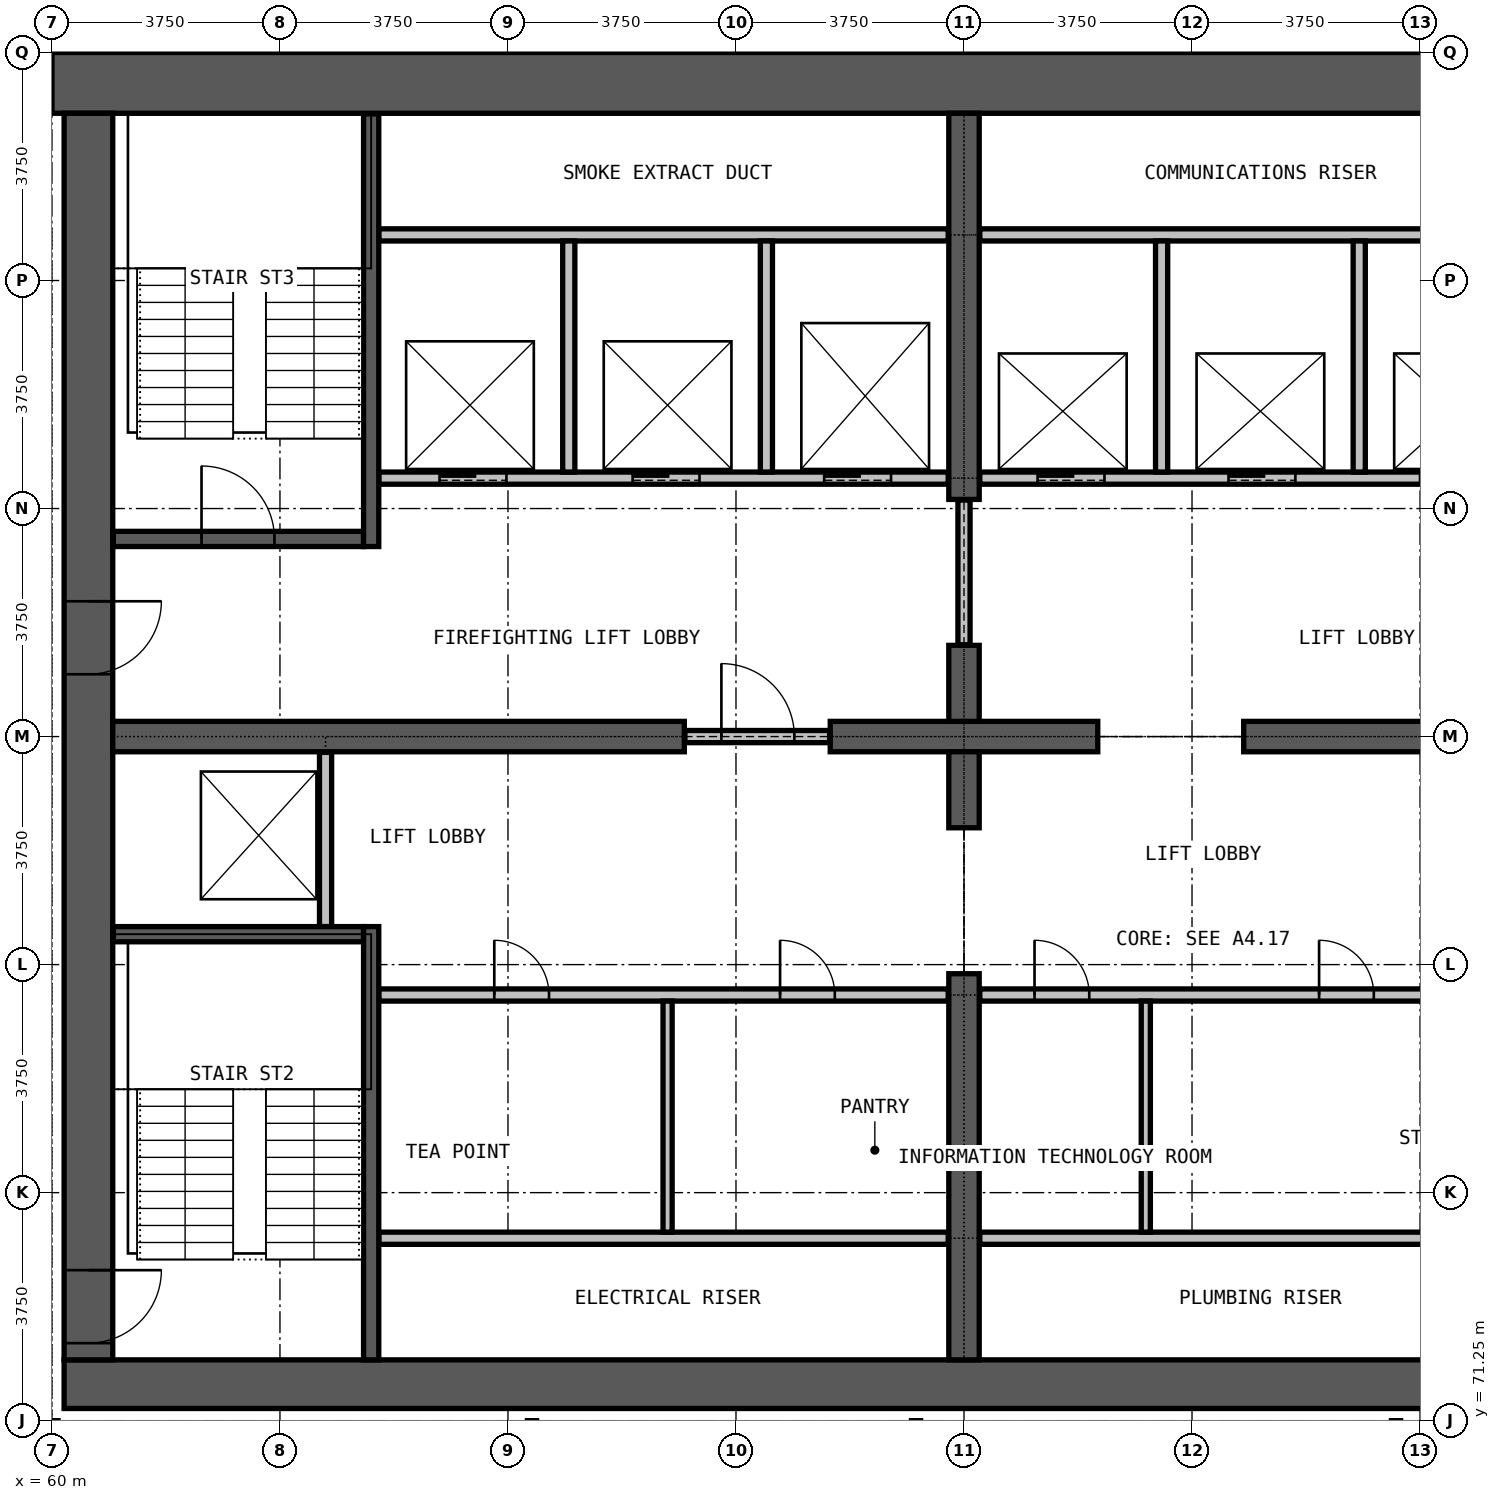
"""IFC4 building model, lengths in metres.
Left out: names, types, materials, properties, quantities, classifications, styles, units other than length and angle.
Written with IfcOpenShell. Run it as: python <this file> out.ifc"""

import sys

from ifc_helpers import new_model, si_unit, direction, frame, frame_2d, origin, place, context, subcontext, project, spatial, rectangle, extrude, element, fill, save


model = new_model("IFC4")
c1 = context("Model", 3, precision=1e-05, world=origin(), true_north=direction((0.0, 1.0)))
c2 = subcontext(c1, "Body", "Model", "MODEL_VIEW")
j1 = project(units=[si_unit("LENGTHUNIT", "METRE"), si_unit("PLANEANGLEUNIT", "RADIAN")], contexts=[c1])
p1 = place(None, origin())
s1 = spatial("IfcSite", under=j1, at=p1, CompositionType="ELEMENT")
p2 = place(p1, origin())
s2 = spatial("IfcBuilding", under=s1, at=p2, CompositionType="ELEMENT")
p3 = place(p2, frame((0.0, 0.0, 162.1)))
s3 = spatial("IfcBuildingStorey", under=s2, at=p3, CompositionType="ELEMENT", Elevation=162.1)
p4 = place(p3, frame((60.2, 71.85, 0.0), z_axis=(0.0, 0.0, 1.0), x_axis=(1.0, 0.0, 0.0)))
e1 = element("IfcWall", 1, at=p4, inside=s3, PredefinedType="SHEAR", context=c2, shape_type="SweptSolid", body=[
    extrude(rectangle(XDim=29.6, YDim=0.8, at=frame_2d((14.8, 0.0))), origin(), (0.0, 0.0, 1.0), 3.6),
])
p5 = place(p3, frame((90.0, 93.25, 0.0), z_axis=(0.0, 0.0, 1.0), x_axis=(-1.0, 0.0, 0.0)))
e2 = element("IfcWall", 2, at=p5, inside=s3, PredefinedType="SHEAR", context=c2, shape_type="SweptSolid", body=[
    extrude(rectangle(XDim=30.0, YDim=1.0, at=frame_2d((15.0, 0.0))), origin(), (0.0, 0.0, 1.0), 3.6),
])
p6 = place(p3, frame((60.6, 92.75, 0.0), z_axis=(0.0, 0.0, 1.0), x_axis=(0.0, -1.0, 0.0)))
e3 = element("IfcWall", 3, at=p6, inside=s3, PredefinedType="SHEAR", context=c2, shape_type="SweptSolid", body=[
    extrude(rectangle(XDim=20.5, YDim=0.8, at=frame_2d((10.25, 0.0))), origin(), (0.0, 0.0, 1.0), 3.6),
])
p7 = place(p6, frame((19.025, 0.0, 0.0)))
e4 = element("IfcOpeningElement", 4, at=p7, cuts=e3, PredefinedType="OPENING", context=c2, shape_type="SweptSolid", body=[
    extrude(rectangle(XDim=1.2, YDim=2.2, at=frame_2d((0.6, 1.1))), frame((0.0, 0.41, 0.0), z_axis=(0.0, -1.0, 0.0), x_axis=(1.0, 0.0, 0.0)), (0.0, 0.0, 1.0), 0.82),
])
p8 = place(p6, frame((8.025, 0.0, 0.0)))
e5 = element("IfcOpeningElement", 5, at=p8, cuts=e3, PredefinedType="OPENING", context=c2, shape_type="SweptSolid", body=[
    extrude(rectangle(XDim=1.2, YDim=2.2, at=frame_2d((0.6, 1.1))), frame((0.0, 0.41, 0.0), z_axis=(0.0, -1.0, 0.0), x_axis=(1.0, 0.0, 0.0)), (0.0, 0.0, 1.0), 0.82),
])
p9 = place(p3, frame((61.0, 82.5, 0.0), z_axis=(0.0, 0.0, 1.0), x_axis=(1.0, 0.0, 0.0)))
e6 = element("IfcWall", 6, at=p9, inside=s3, PredefinedType="SHEAR", context=c2, shape_type="SweptSolid", body=[
    extrude(rectangle(XDim=9.4, YDim=0.5, at=frame_2d((4.7, 0.0))), origin(), (0.0, 0.0, 1.0), 3.6),
])
p10 = place(p3, frame((72.8, 82.5, 0.0), z_axis=(0.0, 0.0, 1.0), x_axis=(1.0, 0.0, 0.0)))
e7 = element("IfcWall", 7, at=p10, inside=s3, PredefinedType="SHEAR", context=c2, shape_type="SweptSolid", body=[
    extrude(rectangle(XDim=4.4, YDim=0.5, at=frame_2d((2.2, 0.0))), origin(), (0.0, 0.0, 1.0), 3.6),
])
p11 = place(p3, frame((79.6, 82.5, 0.0), z_axis=(0.0, 0.0, 1.0), x_axis=(1.0, 0.0, 0.0)))
e8 = element("IfcWall", 8, at=p11, inside=s3, PredefinedType="SHEAR", context=c2, shape_type="SweptSolid", body=[
    extrude(rectangle(XDim=9.4, YDim=0.5, at=frame_2d((4.7, 0.0))), origin(), (0.0, 0.0, 1.0), 3.6),
])
p12 = place(p3, frame((75.0, 72.25, 0.0), z_axis=(0.0, 0.0, 1.0), x_axis=(0.0, 1.0, 0.0)))
e9 = element("IfcWall", 9, at=p12, inside=s3, PredefinedType="SHEAR", context=c2, shape_type="SweptSolid", body=[
    extrude(rectangle(XDim=6.35, YDim=0.5, at=frame_2d((3.175, 0.0))), origin(), (0.0, 0.0, 1.0), 3.6),
])
for number, where, z_axis, x_axis in (
    (10, (75.0, 81.0, 0.0), (0.0, 0.0, 1.0), (0.0, 1.0, 0.0)),
    (11, (75.0, 82.75, 0.0), (0.0, 0.0, 1.0), (0.0, 1.0, 0.0)),
):
    element("IfcWall", number, at=place(p3, frame(where, z_axis=z_axis, x_axis=x_axis)), inside=s3, PredefinedType="SHEAR", context=c2, shape_type="SweptSolid", body=[
        extrude(rectangle(XDim=1.25, YDim=0.5, at=frame_2d((0.625, 0.0))), origin(), (0.0, 0.0, 1.0), 3.6),
    ])
p13 = place(p3, frame((75.0, 86.4, 0.0), z_axis=(0.0, 0.0, 1.0), x_axis=(0.0, 1.0, 0.0)))
e12 = element("IfcWall", 12, at=p13, inside=s3, PredefinedType="SHEAR", context=c2, shape_type="SweptSolid", body=[
    extrude(rectangle(XDim=6.35, YDim=0.5, at=frame_2d((3.175, 0.0))), origin(), (0.0, 0.0, 1.0), 3.6),
])
for number, where, z_axis, x_axis in (
    (13, (65.375, 74.25, 0.0), (0.0, 0.0, 1.0), (1.0, 0.0, 0.0)),
    (14, (75.26, 74.25, 0.0), (0.0, 0.0, 1.0), (1.0, 0.0, 0.0)),
):
    element("IfcWall", number, at=place(p3, frame(where, z_axis=z_axis, x_axis=x_axis)), inside=s3, PredefinedType="PARTITIONING", context=c2, shape_type="SweptSolid", body=[
        extrude(rectangle(XDim=9.365, YDim=0.2, at=frame_2d((4.683, 0.0))), origin(), (0.0, 0.0, 1.0), 3.3),
    ])
p14 = place(p3, frame((65.375, 78.25, 0.0), z_axis=(0.0, 0.0, 1.0), x_axis=(1.0, 0.0, 0.0)))
e15 = element("IfcWall", 15, at=p14, inside=s3, PredefinedType="PARTITIONING", context=c2, shape_type="SweptSolid", body=[
    extrude(rectangle(XDim=9.365, YDim=0.2, at=frame_2d((4.683, 0.0))), origin(), (0.0, 0.0, 1.0), 3.3),
])
p15 = place(p14, frame((1.9, 0.0, 0.0)))
e16 = element("IfcOpeningElement", 16, at=p15, cuts=e15, PredefinedType="OPENING", context=c2, shape_type="SweptSolid", body=[
    extrude(rectangle(XDim=0.9, YDim=2.2, at=frame_2d((0.45, 1.1))), frame((0.0, 0.11, 0.0), z_axis=(0.0, -1.0, 0.0), x_axis=(1.0, 0.0, 0.0)), (0.0, 0.0, 1.0), 0.22),
])
p16 = place(p14, frame((6.6, 0.0, 0.0)))
e17 = element("IfcOpeningElement", 17, at=p16, cuts=e15, PredefinedType="OPENING", context=c2, shape_type="SweptSolid", body=[
    extrude(rectangle(XDim=0.9, YDim=2.2, at=frame_2d((0.45, 1.1))), frame((0.0, 0.11, 0.0), z_axis=(0.0, -1.0, 0.0), x_axis=(1.0, 0.0, 0.0)), (0.0, 0.0, 1.0), 0.22),
])
p17 = place(p3, frame((75.26, 78.25, 0.0), z_axis=(0.0, 0.0, 1.0), x_axis=(1.0, 0.0, 0.0)))
e18 = element("IfcWall", 18, at=p17, inside=s3, PredefinedType="PARTITIONING", context=c2, shape_type="SweptSolid", body=[
    extrude(rectangle(XDim=9.365, YDim=0.2, at=frame_2d((4.683, 0.0))), origin(), (0.0, 0.0, 1.0), 3.3),
])
p18 = place(p17, frame((0.9, 0.0, 0.0)))
e19 = element("IfcOpeningElement", 19, at=p18, cuts=e18, PredefinedType="OPENING", context=c2, shape_type="SweptSolid", body=[
    extrude(rectangle(XDim=0.9, YDim=2.2, at=frame_2d((0.45, 1.1))), frame((0.0, 0.11, 0.0), z_axis=(0.0, -1.0, 0.0), x_axis=(1.0, 0.0, 0.0)), (0.0, 0.0, 1.0), 0.22),
])
p19 = place(p17, frame((5.58, 0.0, 0.0)))
e20 = element("IfcOpeningElement", 20, at=p19, cuts=e18, PredefinedType="OPENING", context=c2, shape_type="SweptSolid", body=[
    extrude(rectangle(XDim=0.9, YDim=2.2, at=frame_2d((0.45, 1.1))), frame((0.0, 0.11, 0.0), z_axis=(0.0, -1.0, 0.0), x_axis=(1.0, 0.0, 0.0)), (0.0, 0.0, 1.0), 0.22),
])
p20 = place(p3, frame((70.41, 82.5, 0.0), z_axis=(0.0, 0.0, 1.0), x_axis=(1.0, 0.0, 0.0)))
e21 = element("IfcWall", 21, at=p20, inside=s3, PredefinedType="PARTITIONING", context=c2, shape_type="SweptSolid", body=[
    extrude(rectangle(XDim=2.38, YDim=0.2, at=frame_2d((1.19, 0.0))), origin(), (0.0, 0.0, 1.0), 2.4),
])
p21 = place(p20, frame((0.6, 0.0, 0.0)))
e22 = element("IfcOpeningElement", 22, at=p21, cuts=e21, PredefinedType="OPENING", context=c2, shape_type="SweptSolid", body=[
    extrude(rectangle(XDim=1.2, YDim=2.2, at=frame_2d((0.6, 1.1))), frame((0.0, 0.11, 0.0), z_axis=(0.0, -1.0, 0.0), x_axis=(1.0, 0.0, 0.0)), (0.0, 0.0, 1.0), 0.22),
])
p22 = place(p3, frame((75.0, 84.01, 0.0), z_axis=(0.0, 0.0, 1.0), x_axis=(0.0, 1.0, 0.0)))
e23 = element("IfcWall", 23, at=p22, inside=s3, PredefinedType="PARTITIONING", context=c2, shape_type="SweptSolid", body=[
    extrude(rectangle(XDim=2.38, YDim=0.2, at=frame_2d((1.19, 0.0))), origin(), (0.0, 0.0, 1.0), 2.4),
])
for number, where, z_axis, x_axis in (
    (24, (70.125, 74.35, 0.0), (0.0, 0.0, 1.0), (0.0, 1.0, 0.0)),
    (25, (77.99, 74.35, 0.0), (0.0, 0.0, 1.0), (0.0, 1.0, 0.0)),
):
    element("IfcWall", number, at=place(p3, frame(where, z_axis=z_axis, x_axis=x_axis)), inside=s3, PredefinedType="PARTITIONING", context=c2, shape_type="SweptSolid", body=[
        extrude(rectangle(XDim=3.8, YDim=0.15, at=frame_2d((1.9, 0.0))), origin(), (0.0, 0.0, 1.0), 3.3),
    ])
p23 = place(p3, frame((65.375, 86.75, 0.0), z_axis=(0.0, 0.0, 1.0), x_axis=(1.0, 0.0, 0.0)))
e26 = element("IfcWall", 26, at=p23, inside=s3, PredefinedType="PARTITIONING", context=c2, shape_type="SweptSolid", body=[
    extrude(rectangle(XDim=9.365, YDim=0.2, at=frame_2d((4.683, 0.0))), origin(), (0.0, 0.0, 1.0), 3.3),
])
p24 = place(p23, frame((1.0, 0.0, 0.0)))
e27 = element("IfcOpeningElement", 27, at=p24, cuts=e26, PredefinedType="OPENING", context=c2, shape_type="SweptSolid", body=[
    extrude(rectangle(XDim=1.1, YDim=2.2, at=frame_2d((0.55, 1.1))), frame((0.0, 0.11, 0.0), z_axis=(0.0, -1.0, 0.0), x_axis=(1.0, 0.0, 0.0)), (0.0, 0.0, 1.0), 0.22),
])
p25 = place(p23, frame((4.175, 0.0, 0.0)))
e28 = element("IfcOpeningElement", 28, at=p25, cuts=e26, PredefinedType="OPENING", context=c2, shape_type="SweptSolid", body=[
    extrude(rectangle(XDim=1.1, YDim=2.2, at=frame_2d((0.55, 1.1))), frame((0.0, 0.11, 0.0), z_axis=(0.0, -1.0, 0.0), x_axis=(1.0, 0.0, 0.0)), (0.0, 0.0, 1.0), 0.22),
])
p26 = place(p23, frame((7.325, 0.0, 0.0)))
e29 = element("IfcOpeningElement", 29, at=p26, cuts=e26, PredefinedType="OPENING", context=c2, shape_type="SweptSolid", body=[
    extrude(rectangle(XDim=1.1, YDim=2.2, at=frame_2d((0.55, 1.1))), frame((0.0, 0.11, 0.0), z_axis=(0.0, -1.0, 0.0), x_axis=(1.0, 0.0, 0.0)), (0.0, 0.0, 1.0), 0.22),
])
p27 = place(p3, frame((75.26, 86.75, 0.0), z_axis=(0.0, 0.0, 1.0), x_axis=(1.0, 0.0, 0.0)))
e30 = element("IfcWall", 30, at=p27, inside=s3, PredefinedType="PARTITIONING", context=c2, shape_type="SweptSolid", body=[
    extrude(rectangle(XDim=9.365, YDim=0.2, at=frame_2d((4.683, 0.0))), origin(), (0.0, 0.0, 1.0), 3.3),
])
p28 = place(p27, frame((0.95, 0.0, 0.0)))
e31 = element("IfcOpeningElement", 31, at=p28, cuts=e30, PredefinedType="OPENING", context=c2, shape_type="SweptSolid", body=[
    extrude(rectangle(XDim=1.1, YDim=2.2, at=frame_2d((0.55, 1.1))), frame((0.0, 0.11, 0.0), z_axis=(0.0, -1.0, 0.0), x_axis=(1.0, 0.0, 0.0)), (0.0, 0.0, 1.0), 0.22),
])
p29 = place(p27, frame((4.09, 0.0, 0.0)))
e32 = element("IfcOpeningElement", 32, at=p29, cuts=e30, PredefinedType="OPENING", context=c2, shape_type="SweptSolid", body=[
    extrude(rectangle(XDim=1.1, YDim=2.2, at=frame_2d((0.55, 1.1))), frame((0.0, 0.11, 0.0), z_axis=(0.0, -1.0, 0.0), x_axis=(1.0, 0.0, 0.0)), (0.0, 0.0, 1.0), 0.22),
])
p30 = place(p27, frame((7.24, 0.0, 0.0)))
e33 = element("IfcOpeningElement", 33, at=p30, cuts=e30, PredefinedType="OPENING", context=c2, shape_type="SweptSolid", body=[
    extrude(rectangle(XDim=1.1, YDim=2.2, at=frame_2d((0.55, 1.1))), frame((0.0, 0.11, 0.0), z_axis=(0.0, -1.0, 0.0), x_axis=(1.0, 0.0, 0.0)), (0.0, 0.0, 1.0), 0.22),
])
for number, where, z_axis, x_axis in (
    (34, (65.375, 90.75, 0.0), (0.0, 0.0, 1.0), (1.0, 0.0, 0.0)),
    (35, (75.26, 90.75, 0.0), (0.0, 0.0, 1.0), (1.0, 0.0, 0.0)),
):
    element("IfcWall", number, at=place(p3, frame(where, z_axis=z_axis, x_axis=x_axis)), inside=s3, PredefinedType="PARTITIONING", context=c2, shape_type="SweptSolid", body=[
        extrude(rectangle(XDim=9.365, YDim=0.2, at=frame_2d((4.683, 0.0))), origin(), (0.0, 0.0, 1.0), 3.3),
    ])
p31 = place(p3, frame((64.5, 79.375, 0.0), z_axis=(0.0, 0.0, 1.0), x_axis=(0.0, 1.0, 0.0)))
e36 = element("IfcWall", 36, at=p31, inside=s3, PredefinedType="PARTITIONING", context=c2, shape_type="SweptSolid", body=[
    extrude(rectangle(XDim=2.865, YDim=0.2, at=frame_2d((1.433, 0.0))), origin(), (0.0, 0.0, 1.0), 3.3),
])
for number, where, z_axis, x_axis in (
    (37, (68.5, 86.85, 0.0), (0.0, 0.0, 1.0), (0.0, 1.0, 0.0)),
    (38, (71.75, 86.85, 0.0), (0.0, 0.0, 1.0), (0.0, 1.0, 0.0)),
    (39, (78.25, 86.85, 0.0), (0.0, 0.0, 1.0), (0.0, 1.0, 0.0)),
    (40, (81.5, 86.85, 0.0), (0.0, 0.0, 1.0), (0.0, 1.0, 0.0)),
):
    element("IfcWall", number, at=place(p3, frame(where, z_axis=z_axis, x_axis=x_axis)), inside=s3, PredefinedType="PARTITIONING", context=c2, shape_type="SweptSolid", body=[
        extrude(rectangle(XDim=3.8, YDim=0.2, at=frame_2d((1.9, 0.0))), origin(), (0.0, 0.0, 1.0), 3.3),
    ])
p32 = place(p3, frame((61.01, 79.25, 0.0), z_axis=(0.0, 0.0, 1.0), x_axis=(1.0, 0.0, 0.0)))
e41 = element("IfcWall", 41, at=p32, inside=s3, PredefinedType="PARTITIONING", context=c2, shape_type="SweptSolid", body=[
    extrude(rectangle(XDim=4.115, YDim=0.25, at=frame_2d((2.058, 0.0))), origin(), (0.0, 0.0, 1.0), 3.3),
])
p33 = place(p3, frame((61.01, 85.75, 0.0), z_axis=(0.0, 0.0, 1.0), x_axis=(1.0, 0.0, 0.0)))
e42 = element("IfcWall", 42, at=p33, inside=s3, PredefinedType="PARTITIONING", context=c2, shape_type="SweptSolid", body=[
    extrude(rectangle(XDim=4.115, YDim=0.25, at=frame_2d((2.058, 0.0))), origin(), (0.0, 0.0, 1.0), 3.3),
])
p34 = place(p33, frame((1.45, 0.0, 0.0)))
e43 = element("IfcOpeningElement", 43, at=p34, cuts=e42, PredefinedType="OPENING", context=c2, shape_type="SweptSolid", body=[
    extrude(rectangle(XDim=1.2, YDim=2.2, at=frame_2d((0.6, 1.1))), frame((0.0, 0.135, 0.0), z_axis=(0.0, -1.0, 0.0), x_axis=(1.0, 0.0, 0.0)), (0.0, 0.0, 1.0), 0.27),
])
p35 = place(p3, frame((65.25, 72.25, 0.0), z_axis=(0.0, 0.0, 1.0), x_axis=(0.0, 1.0, 0.0)))
e44 = element("IfcWall", 44, at=p35, inside=s3, PredefinedType="PARTITIONING", context=c2, shape_type="SweptSolid", body=[
    extrude(rectangle(XDim=7.125, YDim=0.25, at=frame_2d((3.562, 0.0))), origin(), (0.0, 0.0, 1.0), 3.3),
])
p36 = place(p3, frame((65.25, 85.625, 0.0), z_axis=(0.0, 0.0, 1.0), x_axis=(0.0, 1.0, 0.0)))
e45 = element("IfcWall", 45, at=p36, inside=s3, PredefinedType="PARTITIONING", context=c2, shape_type="SweptSolid", body=[
    extrude(rectangle(XDim=7.115, YDim=0.25, at=frame_2d((3.558, 0.0))), origin(), (0.0, 0.0, 1.0), 3.3),
])
p37 = place(p28, origin())
e46 = element("IfcDoor", 46, at=p37, inside=s3, OperationType="DOUBLE_DOOR_SLIDING", PredefinedType="DOOR", context=c2, shape_type="SweptSolid", body=[
    extrude(rectangle(XDim=1.1, YDim=2.2, at=frame_2d((0.55, 1.1))), frame((0.0, 0.025, 0.0), z_axis=(0.0, -1.0, 0.0), x_axis=(1.0, 0.0, 0.0)), (0.0, 0.0, 1.0), 0.05),
])
fill(e31, e46)
p38 = place(p29, origin())
e47 = element("IfcDoor", 47, at=p38, inside=s3, OperationType="DOUBLE_DOOR_SLIDING", PredefinedType="DOOR", context=c2, shape_type="SweptSolid", body=[
    extrude(rectangle(XDim=1.1, YDim=2.2, at=frame_2d((0.55, 1.1))), frame((0.0, 0.025, 0.0), z_axis=(0.0, -1.0, 0.0), x_axis=(1.0, 0.0, 0.0)), (0.0, 0.0, 1.0), 0.05),
])
fill(e32, e47)
p39 = place(p24, origin())
e48 = element("IfcDoor", 48, at=p39, inside=s3, OperationType="DOUBLE_DOOR_SLIDING", PredefinedType="DOOR", context=c2, shape_type="SweptSolid", body=[
    extrude(rectangle(XDim=1.1, YDim=2.2, at=frame_2d((0.55, 1.1))), frame((0.0, 0.025, 0.0), z_axis=(0.0, -1.0, 0.0), x_axis=(1.0, 0.0, 0.0)), (0.0, 0.0, 1.0), 0.05),
])
fill(e27, e48)
p40 = place(p25, origin())
e49 = element("IfcDoor", 49, at=p40, inside=s3, OperationType="DOUBLE_DOOR_SLIDING", PredefinedType="DOOR", context=c2, shape_type="SweptSolid", body=[
    extrude(rectangle(XDim=1.1, YDim=2.2, at=frame_2d((0.55, 1.1))), frame((0.0, 0.025, 0.0), z_axis=(0.0, -1.0, 0.0), x_axis=(1.0, 0.0, 0.0)), (0.0, 0.0, 1.0), 0.05),
])
fill(e28, e49)
p41 = place(p26, origin())
e50 = element("IfcDoor", 50, at=p41, inside=s3, OperationType="DOUBLE_DOOR_SLIDING", PredefinedType="DOOR", context=c2, shape_type="SweptSolid", body=[
    extrude(rectangle(XDim=1.1, YDim=2.2, at=frame_2d((0.55, 1.1))), frame((0.0, 0.025, 0.0), z_axis=(0.0, -1.0, 0.0), x_axis=(1.0, 0.0, 0.0)), (0.0, 0.0, 1.0), 0.05),
])
fill(e29, e50)
p42 = place(p21, origin())
e51 = element("IfcDoor", 51, at=p42, inside=s3, OperationType="SINGLE_SWING_LEFT", PredefinedType="DOOR", context=c2, shape_type="SweptSolid", body=[
    extrude(rectangle(XDim=1.2, YDim=2.2, at=frame_2d((0.6, 1.1))), frame((0.0, 0.025, 0.0), z_axis=(0.0, -1.0, 0.0), x_axis=(1.0, 0.0, 0.0)), (0.0, 0.0, 1.0), 0.05),
])
fill(e22, e51)
p43 = place(p34, origin())
e52 = element("IfcDoor", 52, at=p43, inside=s3, OperationType="SINGLE_SWING_RIGHT", PredefinedType="DOOR", context=c2, shape_type="SweptSolid", body=[
    extrude(rectangle(XDim=1.2, YDim=2.2, at=frame_2d((0.6, 1.1))), frame((0.0, 0.025, 0.0), z_axis=(0.0, -1.0, 0.0), x_axis=(1.0, 0.0, 0.0)), (0.0, 0.0, 1.0), 0.05),
])
fill(e43, e52)
p44 = place(p7, origin())
e53 = element("IfcDoor", 53, at=p44, inside=s3, OperationType="SINGLE_SWING_LEFT", PredefinedType="DOOR", context=c2, shape_type="SweptSolid", body=[
    extrude(rectangle(XDim=1.2, YDim=2.2, at=frame_2d((0.6, 1.1))), frame((0.0, 0.025, 0.0), z_axis=(0.0, -1.0, 0.0), x_axis=(1.0, 0.0, 0.0)), (0.0, 0.0, 1.0), 0.05),
])
fill(e4, e53)
p45 = place(p8, origin())
e54 = element("IfcDoor", 54, at=p45, inside=s3, OperationType="SINGLE_SWING_LEFT", PredefinedType="DOOR", context=c2, shape_type="SweptSolid", body=[
    extrude(rectangle(XDim=1.2, YDim=2.2, at=frame_2d((0.6, 1.1))), frame((0.0, 0.025, 0.0), z_axis=(0.0, -1.0, 0.0), x_axis=(1.0, 0.0, 0.0)), (0.0, 0.0, 1.0), 0.05),
])
fill(e5, e54)
p46 = place(p15, origin())
e55 = element("IfcDoor", 55, at=p46, inside=s3, OperationType="SINGLE_SWING_RIGHT", PredefinedType="DOOR", context=c2, shape_type="SweptSolid", body=[
    extrude(rectangle(XDim=0.9, YDim=2.2, at=frame_2d((0.45, 1.1))), frame((0.0, 0.025, 0.0), z_axis=(0.0, -1.0, 0.0), x_axis=(1.0, 0.0, 0.0)), (0.0, 0.0, 1.0), 0.05),
])
fill(e16, e55)
p47 = place(p16, origin())
e56 = element("IfcDoor", 56, at=p47, inside=s3, OperationType="SINGLE_SWING_LEFT", PredefinedType="DOOR", context=c2, shape_type="SweptSolid", body=[
    extrude(rectangle(XDim=0.9, YDim=2.2, at=frame_2d((0.45, 1.1))), frame((0.0, 0.025, 0.0), z_axis=(0.0, -1.0, 0.0), x_axis=(1.0, 0.0, 0.0)), (0.0, 0.0, 1.0), 0.05),
])
fill(e17, e56)
p48 = place(p18, origin())
e57 = element("IfcDoor", 57, at=p48, inside=s3, OperationType="SINGLE_SWING_RIGHT", PredefinedType="DOOR", context=c2, shape_type="SweptSolid", body=[
    extrude(rectangle(XDim=0.9, YDim=2.2, at=frame_2d((0.45, 1.1))), frame((0.0, 0.025, 0.0), z_axis=(0.0, -1.0, 0.0), x_axis=(1.0, 0.0, 0.0)), (0.0, 0.0, 1.0), 0.05),
])
fill(e19, e57)
p49 = place(p19, origin())
e58 = element("IfcDoor", 58, at=p49, inside=s3, OperationType="SINGLE_SWING_RIGHT", PredefinedType="DOOR", context=c2, shape_type="SweptSolid", body=[
    extrude(rectangle(XDim=0.9, YDim=2.2, at=frame_2d((0.45, 1.1))), frame((0.0, 0.025, 0.0), z_axis=(0.0, -1.0, 0.0), x_axis=(1.0, 0.0, 0.0)), (0.0, 0.0, 1.0), 0.05),
])
fill(e20, e58)
save(model, sys.argv[1])
